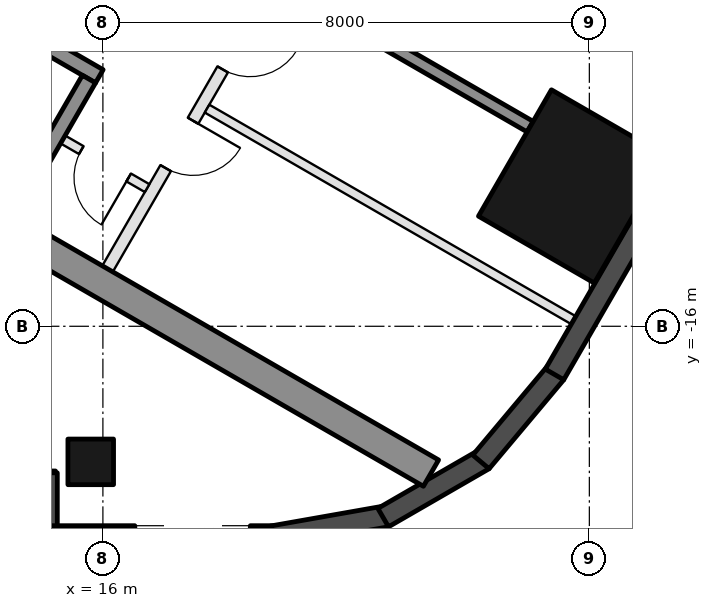
"""IFC4 building model, lengths in metres.
Left out: names, types, materials, properties, quantities, classifications, styles, units other than length and angle.
Written with IfcOpenShell. Run it as: python <this file> out.ifc"""

import sys

from ifc_helpers import new_model, si_unit, direction, frame, frame_2d, origin, origin_2d, place, context, subcontext, project, spatial, rectangle, hollow_rectangle, extrude, element, fill, save


model = new_model("IFC4")
c1 = context("Model", 3, precision=1e-05, world=origin(), true_north=direction((0.0, 1.0)))
c2 = subcontext(c1, "Body", "Model", "MODEL_VIEW")
j1 = project(units=[si_unit("LENGTHUNIT", "METRE"), si_unit("PLANEANGLEUNIT", "RADIAN")], contexts=[c1])
p1 = place(None, origin())
s1 = spatial("IfcSite", under=j1, at=p1, CompositionType="ELEMENT")
p2 = place(p1, origin())
s2 = spatial("IfcBuilding", under=s1, at=p2, CompositionType="ELEMENT")
p3 = place(p2, frame((0.0, 0.0, 187.3)))
s3 = spatial("IfcBuildingStorey", under=s2, at=p3, CompositionType="ELEMENT", Elevation=187.3)
p4 = place(p3, frame((15.8, -18.23, 0.0), z_axis=(0.0, 0.0, 1.0), x_axis=(-1.0, 0.0, 0.0)))
e1 = element("IfcColumn", 1, at=p4, inside=s3, PredefinedType="COLUMN", context=c2, shape_type="SweptSolid", body=[
    extrude(hollow_rectangle(XDim=0.75, YDim=0.75, WallThickness=0.035, at=origin_2d()), origin(), (0.0, 0.0, 1.0), 3.7),
])
p5 = place(p3, frame((23.729, -13.7, 0.0), z_axis=(0.0, 0.0, 1.0), x_axis=(0.5, 0.866025403784, 0.0)))
e2 = element("IfcColumn", 2, at=p5, inside=s3, PredefinedType="COLUMN", context=c2, shape_type="SweptSolid", body=[
    extrude(hollow_rectangle(XDim=2.4, YDim=2.2, WallThickness=0.06, at=origin_2d()), origin(), (0.0, 0.0, 1.0), 3.7),
])
p6 = place(p3, frame((8.48, -18.555, 0.0), z_axis=(0.0, 0.0, 1.0), x_axis=(1.0, 0.0, 0.0)))
e3 = element("IfcWall", 3, at=p6, inside=s3, PredefinedType="SOLIDWALL", context=c2, shape_type="SweptSolid", body=[
    extrude(rectangle(XDim=6.74, YDim=0.35, at=frame_2d((3.37, 0.0))), origin(), (0.0, 0.0, 1.0), 3.55),
])
p7 = place(p6, frame((0.32, 0.0, 0.0)))
e4 = element("IfcOpeningElement", 4, at=p7, cuts=e3, PredefinedType="OPENING", context=c2, shape_type="SweptSolid", body=[
    extrude(rectangle(XDim=2.4, YDim=2.4, at=frame_2d((1.2, 1.2))), frame((0.0, 0.185, 0.0), z_axis=(0.0, -1.0, 0.0), x_axis=(1.0, 0.0, 0.0)), (0.0, 0.0, 1.0), 0.37),
])
p8 = place(p6, frame((3.02, 0.0, 0.3)))
e5 = element("IfcOpeningElement", 5, at=p8, cuts=e3, PredefinedType="OPENING", context=c2, shape_type="SweptSolid", body=[
    extrude(rectangle(XDim=2.9, YDim=2.65, at=frame_2d((1.45, 1.325))), frame((0.0, 0.185, 0.0), z_axis=(0.0, -1.0, 0.0), x_axis=(1.0, 0.0, 0.0)), (0.0, 0.0, 1.0), 0.37),
])
p9 = place(p3, frame((15.075, -18.41, 0.0), z_axis=(0.0, 0.0, 1.0), x_axis=(0.0, -1.0, 0.0)))
e6 = element("IfcWall", 6, at=p9, inside=s3, PredefinedType="SOLIDWALL", context=c2, shape_type="SweptSolid", body=[
    extrude(rectangle(XDim=1.22, YDim=0.35, at=frame_2d((0.61, 0.0))), origin(), (0.0, 0.0, 1.0), 3.55),
])
p10 = place(p3, frame((14.9, -19.455, 0.0), z_axis=(0.0, 0.0, 1.0), x_axis=(1.0, 0.0, 0.0)))
e7 = element("IfcWall", 7, at=p10, inside=s3, PredefinedType="SOLIDWALL", context=c2, shape_type="SweptSolid", body=[
    extrude(rectangle(XDim=3.916, YDim=0.35, at=frame_2d((1.958, 0.0))), origin(), (0.0, 0.0, 1.0), 3.55),
])
p11 = place(p10, frame((1.625, 0.0, 0.3)))
e8 = element("IfcOpeningElement", 8, at=p11, cuts=e7, PredefinedType="OPENING", context=c2, shape_type="SweptSolid", body=[
    extrude(rectangle(XDim=1.9, YDim=2.65, at=frame_2d((0.95, 1.325))), frame((0.0, 0.185, 0.0), z_axis=(0.0, -1.0, 0.0), x_axis=(1.0, 0.0, 0.0)), (0.0, 0.0, 1.0), 0.37),
])
p12 = place(p3, frame((18.785, -19.458, 0.0), z_axis=(0.0, 0.0, 1.0), x_axis=(0.984798995425, 0.173697837091, 0.0)))
e9 = element("IfcWall", 9, at=p12, inside=s3, PredefinedType="SOLIDWALL", context=c2, shape_type="SweptSolid", body=[
    extrude(rectangle(XDim=1.91, YDim=0.35, at=frame_2d((0.955, 0.0))), origin(), (0.0, 0.0, 1.0), 3.55),
])
for number, where, z_axis, x_axis in (
    (10, (20.61, -19.147, 0.0), (0.0, 0.0, 1.0), (0.866, 0.5, 0.0)),
    (11, (22.217, -18.231, 0.0), (0.0, 0.0, 1.0), (0.643, 0.766, 0.0)),
):
    element("IfcWall", number, at=place(p3, frame(where, z_axis=z_axis, x_axis=x_axis)), inside=s3, PredefinedType="SOLIDWALL", context=c2, shape_type="SweptSolid", body=[
        extrude(rectangle(XDim=1.91, YDim=0.35, at=frame_2d((0.955, 0.0))), origin(), (0.0, 0.0, 1.0), 3.55),
    ])
p13 = place(p3, frame((23.427, -16.792, 0.0), z_axis=(0.0, 0.0, 1.0), x_axis=(0.500018773155, 0.866014564827, 0.0)))
e12 = element("IfcWall", 12, at=p13, inside=s3, PredefinedType="SOLIDWALL", context=c2, shape_type="SweptSolid", body=[
    extrude(rectangle(XDim=5.658, YDim=0.35, at=frame_2d((2.829, 0.0))), origin(), (0.0, 0.0, 1.0), 3.55),
])
p14 = place(p3, frame((8.547, -10.997, 0.0), z_axis=(0.0, 0.0, 1.0), x_axis=(0.866025009528, -0.500000682871, 0.0)))
e13 = element("IfcWall", 13, at=p14, inside=s3, PredefinedType="SHEAR", context=c2, shape_type="SweptSolid", body=[
    extrude(rectangle(XDim=14.837, YDim=0.5, at=frame_2d((7.418, 0.0))), origin(), (0.0, 0.0, 1.0), 3.5),
])
p15 = place(p3, frame((10.356, -8.664, 0.0), z_axis=(0.0, 0.0, 1.0), x_axis=(0.866028629588, -0.499994412703, 0.0)))
e14 = element("IfcWall", 14, at=p15, inside=s3, PredefinedType="SHEAR", context=c2, shape_type="SweptSolid", body=[
    extrude(rectangle(XDim=6.45, YDim=0.25, at=frame_2d((3.225, 0.0))), origin(), (0.0, 0.0, 1.0), 3.5),
])
p16 = place(p15, frame((0.3, 0.0, 0.0)))
e15 = element("IfcOpeningElement", 15, at=p16, cuts=e14, PredefinedType="OPENING", context=c2, shape_type="SweptSolid", body=[
    extrude(rectangle(XDim=1.0, YDim=2.1, at=frame_2d((0.5, 1.05))), frame((0.0, 0.135, 0.0), z_axis=(0.0, -1.0, 0.0), x_axis=(1.0, 0.0, 0.0)), (0.0, 0.0, 1.0), 0.27),
])
p17 = place(p3, frame((14.496, -14.143, 0.0), z_axis=(0.0, 0.0, 1.0), x_axis=(0.500062241894, 0.865989465428, 0.0)))
e16 = element("IfcWall", 16, at=p17, inside=s3, PredefinedType="SHEAR", context=c2, shape_type="SweptSolid", body=[
    extrude(rectangle(XDim=2.55, YDim=0.25, at=frame_2d((1.275, 0.0))), origin(), (0.0, 0.0, 1.0), 3.5),
])
p18 = place(p3, frame((20.567, -11.297, 0.0), z_axis=(0.0, 0.0, 1.0), x_axis=(0.866055327414, -0.49994816717, 0.0)))
e17 = element("IfcWall", 17, at=p18, inside=s3, PredefinedType="SHEAR", context=c2, shape_type="SweptSolid", body=[
    extrude(rectangle(XDim=2.84, YDim=0.2, at=frame_2d((1.42, 0.0))), origin(), (0.0, 0.0, 1.0), 3.5),
])
p19 = place(p3, frame((16.076, -15.055, 0.0), z_axis=(0.0, 0.0, 1.0), x_axis=(0.499995103361, 0.866028230842, 0.0)))
e18 = element("IfcWall", 18, at=p19, inside=s3, PredefinedType="PARTITIONING", context=c2, shape_type="SweptSolid", body=[
    extrude(rectangle(XDim=5.4, YDim=0.2, at=frame_2d((2.7, 0.0))), origin(), (0.0, 0.0, 1.0), 3.5),
])
p20 = place(p19, frame((1.913, 0.0, 0.0)))
e19 = element("IfcOpeningElement", 19, at=p20, cuts=e18, PredefinedType="OPENING", context=c2, shape_type="SweptSolid", body=[
    extrude(rectangle(XDim=0.9, YDim=2.1, at=frame_2d((0.45, 1.05))), frame((0.0, 0.11, 0.0), z_axis=(0.0, -1.0, 0.0), x_axis=(1.0, 0.0, 0.0)), (0.0, 0.0, 1.0), 0.22),
])
p21 = place(p19, frame((3.788, 0.0, 0.0)))
e20 = element("IfcOpeningElement", 20, at=p21, cuts=e18, PredefinedType="OPENING", context=c2, shape_type="SweptSolid", body=[
    extrude(rectangle(XDim=0.9, YDim=2.1, at=frame_2d((0.45, 1.05))), frame((0.0, 0.11, 0.0), z_axis=(0.0, -1.0, 0.0), x_axis=(1.0, 0.0, 0.0)), (0.0, 0.0, 1.0), 0.22),
])
p22 = place(p3, frame((15.342, -12.928, 0.0), z_axis=(0.0, 0.0, 1.0), x_axis=(0.865989903783, -0.500061482766, 0.0)))
e21 = element("IfcWall", 21, at=p22, inside=s3, PredefinedType="PARTITIONING", context=c2, shape_type="SweptSolid", body=[
    extrude(rectangle(XDim=1.6, YDim=0.15, at=frame_2d((0.8, 0.0))), origin(), (0.0, 0.0, 1.0), 3.5),
])
p23 = place(p22, frame((0.35, 0.0, 0.0)))
e22 = element("IfcOpeningElement", 22, at=p23, cuts=e21, PredefinedType="OPENING", context=c2, shape_type="SweptSolid", body=[
    extrude(rectangle(XDim=0.9, YDim=2.1, at=frame_2d((0.45, 1.05))), frame((0.0, 0.085, 0.0), z_axis=(0.0, -1.0, 0.0), x_axis=(1.0, 0.0, 0.0)), (0.0, 0.0, 1.0), 0.17),
])
p24 = place(p3, frame((17.713, -12.42, 0.0), z_axis=(0.0, 0.0, 1.0), x_axis=(0.866016523273, -0.500015381182, 0.0)))
e23 = element("IfcWall", 23, at=p24, inside=s3, PredefinedType="PARTITIONING", context=c2, shape_type="SweptSolid", body=[
    extrude(rectangle(XDim=6.95, YDim=0.15, at=frame_2d((3.475, 0.0))), origin(), (0.0, 0.0, 1.0), 3.5),
])
p25 = place(p23, frame((0.9, 0.0, 0.0), z_axis=(0.0, 0.0, 1.0), x_axis=(-1.0, 0.0, 0.0)))
e24 = element("IfcDoor", 24, at=p25, inside=s3, OperationType="SINGLE_SWING_LEFT", PredefinedType="DOOR", context=c2, shape_type="SweptSolid", body=[
    extrude(rectangle(XDim=0.9, YDim=2.1, at=frame_2d((0.45, 1.05))), frame((0.0, 0.025, 0.0), z_axis=(0.0, -1.0, 0.0), x_axis=(1.0, 0.0, 0.0)), (0.0, 0.0, 1.0), 0.05),
])
fill(e22, e24)
p26 = place(p20, frame((0.9, 0.0, 0.0), z_axis=(0.0, 0.0, 1.0), x_axis=(-1.0, 0.0, 0.0)))
e25 = element("IfcDoor", 25, at=p26, inside=s3, OperationType="SINGLE_SWING_LEFT", PredefinedType="DOOR", context=c2, shape_type="SweptSolid", body=[
    extrude(rectangle(XDim=0.9, YDim=2.1, at=frame_2d((0.45, 1.05))), frame((0.0, 0.025, 0.0), z_axis=(0.0, -1.0, 0.0), x_axis=(1.0, 0.0, 0.0)), (0.0, 0.0, 1.0), 0.05),
])
fill(e19, e25)
p27 = place(p21, frame((0.9, 0.0, 0.0), z_axis=(0.0, 0.0, 1.0), x_axis=(-1.0, 0.0, 0.0)))
e26 = element("IfcDoor", 26, at=p27, inside=s3, OperationType="SINGLE_SWING_LEFT", PredefinedType="DOOR", context=c2, shape_type="SweptSolid", body=[
    extrude(rectangle(XDim=0.9, YDim=2.1, at=frame_2d((0.45, 1.05))), frame((0.0, 0.025, 0.0), z_axis=(0.0, -1.0, 0.0), x_axis=(1.0, 0.0, 0.0)), (0.0, 0.0, 1.0), 0.05),
])
fill(e20, e26)
save(model, sys.argv[1])
